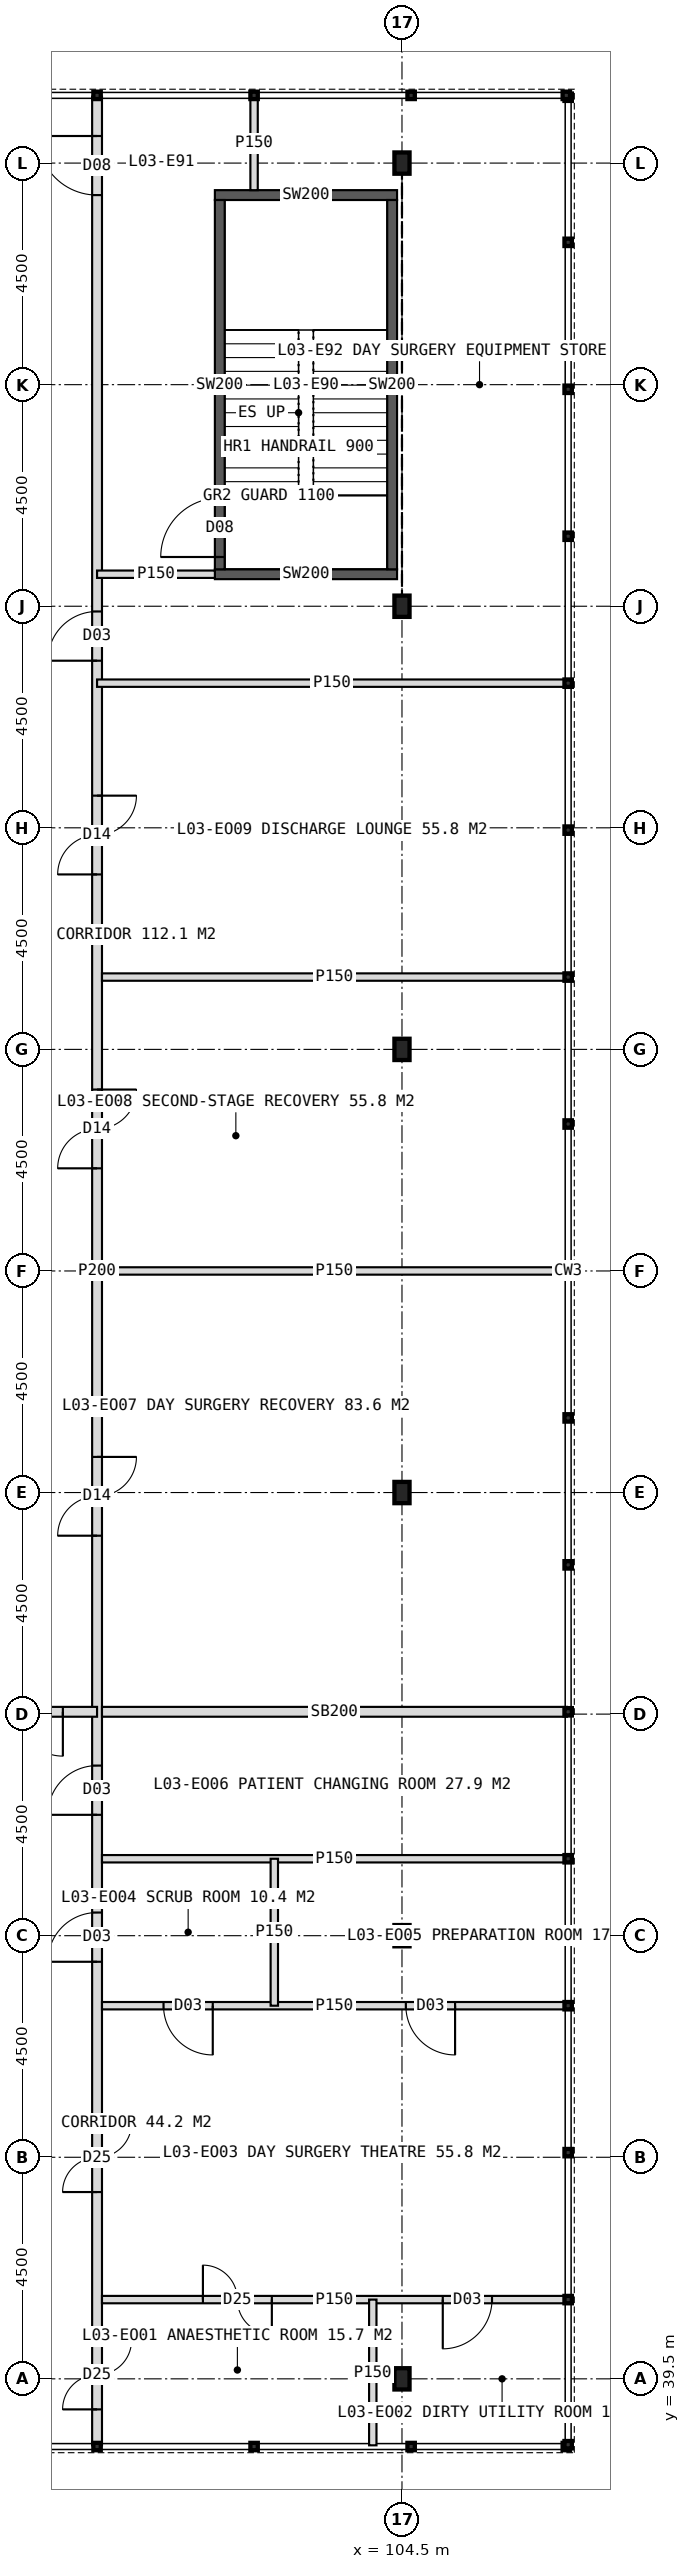
"""IFC4 building model, lengths in metres.
Left out: names, types, materials, properties, quantities, classifications, styles, units other than length and angle.
Written with IfcOpenShell. Run it as: python <this file> out.ifc"""

import sys

from ifc_helpers import new_model, si_unit, direction, frame, frame_2d, origin, origin_2d, place, context, subcontext, project, spatial, rectangle, i_section, extrude, element, fill, save


model = new_model("IFC4")
c1 = context("Model", 3, precision=1e-05, world=origin(), true_north=direction((0.0, 1.0)))
c2 = subcontext(c1, "Body", "Model", "MODEL_VIEW")
j1 = project(units=[si_unit("LENGTHUNIT", "METRE"), si_unit("PLANEANGLEUNIT", "RADIAN")], contexts=[c1])
p1 = place(None, origin())
s1 = spatial("IfcSite", under=j1, at=p1, CompositionType="ELEMENT")
p2 = place(p1, origin())
s2 = spatial("IfcBuilding", under=s1, at=p2, CompositionType="ELEMENT")
p3 = place(p2, frame((0.0, 0.0, 16.5)))
s3 = spatial("IfcBuildingStorey", under=s2, at=p3, CompositionType="ELEMENT", Elevation=16.5)
for number, where, z_axis, x_axis in (
    (1, (104.5, 39.5, 0.0), (0.0, 0.0, 1.0), (1.0, 0.0, 0.0)),
    (2, (104.5, 48.5, 0.0), (0.0, 0.0, 1.0), (1.0, 0.0, 0.0)),
    (3, (104.5, 57.5, 0.0), (0.0, 0.0, 1.0), (1.0, 0.0, 0.0)),
    (4, (104.5, 66.5, 0.0), (0.0, 0.0, 1.0), (1.0, 0.0, 0.0)),
    (5, (104.5, 75.5, 0.0), (0.0, 0.0, 1.0), (1.0, 0.0, 0.0)),
    (6, (104.5, 84.5, 0.0), (0.0, 0.0, 1.0), (1.0, 0.0, 0.0)),
):
    element("IfcColumn", number, at=place(p3, frame(where, z_axis=z_axis, x_axis=x_axis)), inside=s3, PredefinedType="COLUMN", context=c2, shape_type="SweptSolid", body=[
        extrude(i_section(OverallWidth=0.307, OverallDepth=0.432, WebThickness=0.021, FlangeThickness=0.04, FilletRadius=0.027, at=origin_2d()), origin(), (0.0, 0.0, 1.0), 4.5),
    ])
p4 = place(p3, frame((98.307, 38.15, 0.0), z_axis=(0.0, 0.0, 1.0), x_axis=(0.0, 1.0, 0.0)))
e7 = element("IfcWall", 7, at=p4, inside=s3, PredefinedType="PARTITIONING", context=c2, shape_type="SweptSolid", body=[
    extrude(rectangle(XDim=47.7, YDim=0.2, at=frame_2d((23.85, 0.0))), origin(), (0.0, 0.0, 1.0), 4.2),
])
p5 = place(p4, frame((45.7, 0.0, 0.0)))
e8 = element("IfcOpeningElement", 8, at=p5, cuts=e7, PredefinedType="OPENING", context=c2, shape_type="SweptSolid", body=[
    extrude(rectangle(XDim=1.2, YDim=2.1, at=frame_2d((0.6, 1.05))), frame((0.0, 0.11, 0.0), z_axis=(0.0, -1.0, 0.0), x_axis=(1.0, 0.0, 0.0)), (0.0, 0.0, 1.0), 0.22),
])
p6 = place(p4, frame((36.244, 0.0, 0.0)))
e9 = element("IfcOpeningElement", 9, at=p6, cuts=e7, PredefinedType="OPENING", context=c2, shape_type="SweptSolid", body=[
    extrude(rectangle(XDim=1.0, YDim=2.1, at=frame_2d((0.5, 1.05))), frame((0.0, 0.11, 0.0), z_axis=(0.0, -1.0, 0.0), x_axis=(1.0, 0.0, 0.0)), (0.0, 0.0, 1.0), 0.22),
])
p7 = place(p4, frame((0.73, 0.0, 0.0)))
e10 = element("IfcOpeningElement", 10, at=p7, cuts=e7, PredefinedType="OPENING", context=c2, shape_type="SweptSolid", body=[
    extrude(rectangle(XDim=1.4, YDim=2.2, at=frame_2d((0.7, 1.1))), frame((0.0, 0.11, 0.0), z_axis=(0.0, -1.0, 0.0), x_axis=(1.0, 0.0, 0.0)), (0.0, 0.0, 1.0), 0.22),
])
p8 = place(p4, frame((5.144, 0.0, 0.0)))
e11 = element("IfcOpeningElement", 11, at=p8, cuts=e7, PredefinedType="OPENING", context=c2, shape_type="SweptSolid", body=[
    extrude(rectangle(XDim=1.4, YDim=2.2, at=frame_2d((0.7, 1.1))), frame((0.0, 0.11, 0.0), z_axis=(0.0, -1.0, 0.0), x_axis=(1.0, 0.0, 0.0)), (0.0, 0.0, 1.0), 0.22),
])
p9 = place(p4, frame((9.82, 0.0, 0.0)))
e12 = element("IfcOpeningElement", 12, at=p9, cuts=e7, PredefinedType="OPENING", context=c2, shape_type="SweptSolid", body=[
    extrude(rectangle(XDim=1.0, YDim=2.1, at=frame_2d((0.5, 1.05))), frame((0.0, 0.11, 0.0), z_axis=(0.0, -1.0, 0.0), x_axis=(1.0, 0.0, 0.0)), (0.0, 0.0, 1.0), 0.22),
])
p10 = place(p4, frame((12.805, 0.0, 0.0)))
e13 = element("IfcOpeningElement", 13, at=p10, cuts=e7, PredefinedType="OPENING", context=c2, shape_type="SweptSolid", body=[
    extrude(rectangle(XDim=1.0, YDim=2.1, at=frame_2d((0.5, 1.05))), frame((0.0, 0.11, 0.0), z_axis=(0.0, -1.0, 0.0), x_axis=(1.0, 0.0, 0.0)), (0.0, 0.0, 1.0), 0.22),
])
p11 = place(p4, frame((18.473, 0.0, 0.0)))
e14 = element("IfcOpeningElement", 14, at=p11, cuts=e7, PredefinedType="OPENING", context=c2, shape_type="SweptSolid", body=[
    extrude(rectangle(XDim=1.6, YDim=2.2, at=frame_2d((0.8, 1.1))), frame((0.0, 0.11, 0.0), z_axis=(0.0, -1.0, 0.0), x_axis=(1.0, 0.0, 0.0)), (0.0, 0.0, 1.0), 0.22),
])
p12 = place(p4, frame((25.934, 0.0, 0.0)))
e15 = element("IfcOpeningElement", 15, at=p12, cuts=e7, PredefinedType="OPENING", context=c2, shape_type="SweptSolid", body=[
    extrude(rectangle(XDim=1.6, YDim=2.2, at=frame_2d((0.8, 1.1))), frame((0.0, 0.11, 0.0), z_axis=(0.0, -1.0, 0.0), x_axis=(1.0, 0.0, 0.0)), (0.0, 0.0, 1.0), 0.22),
])
p13 = place(p4, frame((31.903, 0.0, 0.0)))
e16 = element("IfcOpeningElement", 16, at=p13, cuts=e7, PredefinedType="OPENING", context=c2, shape_type="SweptSolid", body=[
    extrude(rectangle(XDim=1.6, YDim=2.2, at=frame_2d((0.8, 1.1))), frame((0.0, 0.11, 0.0), z_axis=(0.0, -1.0, 0.0), x_axis=(1.0, 0.0, 0.0)), (0.0, 0.0, 1.0), 0.22),
])
p14 = place(p3, frame((98.307, 53.047, 0.0), z_axis=(0.0, 0.0, 1.0), x_axis=(-1.0, 0.0, 0.0)))
e17 = element("IfcWall", 17, at=p14, inside=s3, PredefinedType="SOLIDWALL", context=c2, shape_type="SweptSolid", body=[
    extrude(rectangle(XDim=3.189, YDim=0.2, at=frame_2d((1.594, 0.0))), origin(), (0.0, 0.0, 1.0), 4.2),
])
p15 = place(p14, frame((0.695, 0.0, 0.0)))
e18 = element("IfcOpeningElement", 18, at=p15, cuts=e17, PredefinedType="OPENING", context=c2, shape_type="SweptSolid", body=[
    extrude(rectangle(XDim=1.8, YDim=2.2, at=frame_2d((0.9, 1.1))), frame((0.0, 0.11, 0.0), z_axis=(0.0, -1.0, 0.0), x_axis=(1.0, 0.0, 0.0)), (0.0, 0.0, 1.0), 0.22),
])
for number, where, z_axis, x_axis in (
    (19, (100.7, 76.15, 0.0), (0.0, 0.0, 1.0), (1.0, 0.0, 0.0)),
    (20, (100.7, 83.85, 0.0), (0.0, 0.0, 1.0), (1.0, 0.0, 0.0)),
):
    element("IfcWall", number, at=place(p3, frame(where, z_axis=z_axis, x_axis=x_axis)), inside=s3, PredefinedType="SOLIDWALL", context=c2, shape_type="SweptSolid", body=[
        extrude(rectangle(XDim=3.7, YDim=0.2, at=frame_2d((1.85, 0.0))), origin(), (0.0, 0.0, 1.0), 4.2),
    ])
p16 = place(p3, frame((100.8, 76.25, 0.0), z_axis=(0.0, 0.0, 1.0), x_axis=(0.0, 1.0, 0.0)))
e21 = element("IfcWall", 21, at=p16, inside=s3, PredefinedType="SOLIDWALL", context=c2, shape_type="SweptSolid", body=[
    extrude(rectangle(XDim=7.5, YDim=0.2, at=frame_2d((3.75, 0.0))), origin(), (0.0, 0.0, 1.0), 4.2),
])
p17 = place(p16, frame((0.25, 0.0, 0.0)))
e22 = element("IfcOpeningElement", 22, at=p17, cuts=e21, PredefinedType="OPENING", context=c2, shape_type="SweptSolid", body=[
    extrude(rectangle(XDim=1.2, YDim=2.1, at=frame_2d((0.6, 1.05))), frame((0.0, 0.11, 0.0), z_axis=(0.0, -1.0, 0.0), x_axis=(1.0, 0.0, 0.0)), (0.0, 0.0, 1.0), 0.22),
])
p18 = place(p3, frame((104.3, 76.25, 0.0), z_axis=(0.0, 0.0, 1.0), x_axis=(0.0, 1.0, 0.0)))
e23 = element("IfcWall", 23, at=p18, inside=s3, PredefinedType="SOLIDWALL", context=c2, shape_type="SweptSolid", body=[
    extrude(rectangle(XDim=7.5, YDim=0.2, at=frame_2d((3.75, 0.0))), origin(), (0.0, 0.0, 1.0), 4.2),
])
p19 = place(p3, frame((100.7, 76.15, 0.0), z_axis=(0.0, 0.0, 1.0), x_axis=(-1.0, 0.0, 0.0)))
e24 = element("IfcWall", 24, at=p19, inside=s3, PredefinedType="PARTITIONING", context=c2, shape_type="SweptSolid", body=[
    extrude(rectangle(XDim=2.393, YDim=0.15, at=frame_2d((1.197, 0.0))), origin(), (0.0, 0.0, 1.0), 4.2),
])
p20 = place(p3, frame((101.496, 83.95, 0.0), z_axis=(0.0, 0.0, 1.0), x_axis=(0.0, 1.0, 0.0)))
e25 = element("IfcWall", 25, at=p20, inside=s3, PredefinedType="PARTITIONING", context=c2, shape_type="SweptSolid", body=[
    extrude(rectangle(XDim=1.9, YDim=0.15, at=frame_2d((0.95, 0.0))), origin(), (0.0, 0.0, 1.0), 4.2),
])
p21 = place(p3, frame((107.85, 73.938, 0.0), z_axis=(0.0, 0.0, 1.0), x_axis=(-1.0, 0.0, 0.0)))
e26 = element("IfcWall", 26, at=p21, inside=s3, PredefinedType="PARTITIONING", context=c2, shape_type="SweptSolid", body=[
    extrude(rectangle(XDim=9.543, YDim=0.15, at=frame_2d((4.771, 0.0))), origin(), (0.0, 0.0, 1.0), 4.2),
])
p22 = place(p3, frame((107.85, 41.109, 0.0), z_axis=(0.0, 0.0, 1.0), x_axis=(-1.0, 0.0, 0.0)))
e27 = element("IfcWall", 27, at=p22, inside=s3, PredefinedType="PARTITIONING", context=c2, shape_type="SweptSolid", body=[
    extrude(rectangle(XDim=9.443, YDim=0.15, at=frame_2d((4.722, 0.0))), origin(), (0.0, 0.0, 1.0), 4.2),
])
p23 = place(p22, frame((5.993, 0.0, 0.0)))
e28 = element("IfcOpeningElement", 28, at=p23, cuts=e27, PredefinedType="OPENING", context=c2, shape_type="SweptSolid", body=[
    extrude(rectangle(XDim=1.4, YDim=2.2, at=frame_2d((0.7, 1.1))), frame((0.0, 0.085, 0.0), z_axis=(0.0, -1.0, 0.0), x_axis=(1.0, 0.0, 0.0)), (0.0, 0.0, 1.0), 0.17),
])
p24 = place(p22, frame((1.521, 0.0, 0.0)))
e29 = element("IfcOpeningElement", 29, at=p24, cuts=e27, PredefinedType="OPENING", context=c2, shape_type="SweptSolid", body=[
    extrude(rectangle(XDim=1.0, YDim=2.1, at=frame_2d((0.5, 1.05))), frame((0.0, 0.085, 0.0), z_axis=(0.0, -1.0, 0.0), x_axis=(1.0, 0.0, 0.0)), (0.0, 0.0, 1.0), 0.17),
])
p25 = place(p3, frame((107.85, 47.078, 0.0), z_axis=(0.0, 0.0, 1.0), x_axis=(-1.0, 0.0, 0.0)))
e30 = element("IfcWall", 30, at=p25, inside=s3, PredefinedType="PARTITIONING", context=c2, shape_type="SweptSolid", body=[
    extrude(rectangle(XDim=9.443, YDim=0.15, at=frame_2d((4.722, 0.0))), origin(), (0.0, 0.0, 1.0), 4.2),
])
p26 = place(p25, frame((7.193, 0.0, 0.0)))
e31 = element("IfcOpeningElement", 31, at=p26, cuts=e30, PredefinedType="OPENING", context=c2, shape_type="SweptSolid", body=[
    extrude(rectangle(XDim=1.0, YDim=2.1, at=frame_2d((0.5, 1.05))), frame((0.0, 0.085, 0.0), z_axis=(0.0, -1.0, 0.0), x_axis=(1.0, 0.0, 0.0)), (0.0, 0.0, 1.0), 0.17),
])
p27 = place(p25, frame((2.271, 0.0, 0.0)))
e32 = element("IfcOpeningElement", 32, at=p27, cuts=e30, PredefinedType="OPENING", context=c2, shape_type="SweptSolid", body=[
    extrude(rectangle(XDim=1.0, YDim=2.1, at=frame_2d((0.5, 1.05))), frame((0.0, 0.085, 0.0), z_axis=(0.0, -1.0, 0.0), x_axis=(1.0, 0.0, 0.0)), (0.0, 0.0, 1.0), 0.17),
])
p28 = place(p3, frame((107.85, 50.062, 0.0), z_axis=(0.0, 0.0, 1.0), x_axis=(-1.0, 0.0, 0.0)))
e33 = element("IfcWall", 33, at=p28, inside=s3, PredefinedType="PARTITIONING", context=c2, shape_type="SweptSolid", body=[
    extrude(rectangle(XDim=9.443, YDim=0.15, at=frame_2d((4.722, 0.0))), origin(), (0.0, 0.0, 1.0), 4.2),
])
p29 = place(p3, frame((107.85, 53.047, 0.0), z_axis=(0.0, 0.0, 1.0), x_axis=(-1.0, 0.0, 0.0)))
e34 = element("IfcWall", 34, at=p29, inside=s3, PredefinedType="SOLIDWALL", context=c2, shape_type="SweptSolid", body=[
    extrude(rectangle(XDim=9.443, YDim=0.2, at=frame_2d((4.722, 0.0))), origin(), (0.0, 0.0, 1.0), 4.2),
])
for number, where, z_axis, x_axis in (
    (35, (107.85, 62.0, 0.0), (0.0, 0.0, 1.0), (-1.0, 0.0, 0.0)),
    (36, (107.85, 67.969, 0.0), (0.0, 0.0, 1.0), (-1.0, 0.0, 0.0)),
):
    element("IfcWall", number, at=place(p3, frame(where, z_axis=z_axis, x_axis=x_axis)), inside=s3, PredefinedType="PARTITIONING", context=c2, shape_type="SweptSolid", body=[
        extrude(rectangle(XDim=9.443, YDim=0.15, at=frame_2d((4.722, 0.0))), origin(), (0.0, 0.0, 1.0), 4.2),
    ])
p30 = place(p3, frame((103.907, 38.15, 0.0), z_axis=(0.0, 0.0, 1.0), x_axis=(0.0, 1.0, 0.0)))
e37 = element("IfcWall", 37, at=p30, inside=s3, PredefinedType="PARTITIONING", context=c2, shape_type="SweptSolid", body=[
    extrude(rectangle(XDim=2.959, YDim=0.15, at=frame_2d((1.48, 0.0))), origin(), (0.0, 0.0, 1.0), 4.2),
])
p31 = place(p3, frame((101.907, 47.078, 0.0), z_axis=(0.0, 0.0, 1.0), x_axis=(0.0, 1.0, 0.0)))
e38 = element("IfcWall", 38, at=p31, inside=s3, PredefinedType="PARTITIONING", context=c2, shape_type="SweptSolid", body=[
    extrude(rectangle(XDim=2.984, YDim=0.15, at=frame_2d((1.492, 0.0))), origin(), (0.0, 0.0, 1.0), 4.2),
])
p32 = place(p15, origin())
e39 = element("IfcDoor", 39, at=p32, inside=s3, OperationType="DOUBLE_DOOR_DOUBLE_SWING", PredefinedType="DOOR", context=c2, shape_type="SweptSolid", body=[
    extrude(rectangle(XDim=1.8, YDim=2.2, at=frame_2d((0.9, 1.1))), frame((0.0, 0.025, 0.0), z_axis=(0.0, -1.0, 0.0), x_axis=(1.0, 0.0, 0.0)), (0.0, 0.0, 1.0), 0.05),
])
fill(e18, e39)
p33 = place(p17, origin())
e40 = element("IfcDoor", 40, at=p33, inside=s3, OperationType="SINGLE_SWING_LEFT", PredefinedType="DOOR", context=c2, shape_type="SweptSolid", body=[
    extrude(rectangle(XDim=1.2, YDim=2.1, at=frame_2d((0.6, 1.05))), frame((0.0, 0.025, 0.0), z_axis=(0.0, -1.0, 0.0), x_axis=(1.0, 0.0, 0.0)), (0.0, 0.0, 1.0), 0.05),
])
fill(e22, e40)
p34 = place(p5, origin())
e41 = element("IfcDoor", 41, at=p34, inside=s3, OperationType="SINGLE_SWING_RIGHT", PredefinedType="DOOR", context=c2, shape_type="SweptSolid", body=[
    extrude(rectangle(XDim=1.2, YDim=2.1, at=frame_2d((0.6, 1.05))), frame((0.0, 0.025, 0.0), z_axis=(0.0, -1.0, 0.0), x_axis=(1.0, 0.0, 0.0)), (0.0, 0.0, 1.0), 0.05),
])
fill(e8, e41)
p35 = place(p6, origin())
e42 = element("IfcDoor", 42, at=p35, inside=s3, OperationType="SINGLE_SWING_LEFT", PredefinedType="DOOR", context=c2, shape_type="SweptSolid", body=[
    extrude(rectangle(XDim=1.0, YDim=2.1, at=frame_2d((0.5, 1.05))), frame((0.0, 0.025, 0.0), z_axis=(0.0, -1.0, 0.0), x_axis=(1.0, 0.0, 0.0)), (0.0, 0.0, 1.0), 0.05),
])
fill(e9, e42)
p36 = place(p7, origin())
e43 = element("IfcDoor", 43, at=p36, inside=s3, OperationType="DOUBLE_DOOR_SINGLE_SWING", PredefinedType="DOOR", context=c2, shape_type="SweptSolid", body=[
    extrude(rectangle(XDim=1.4, YDim=2.2, at=frame_2d((0.7, 1.1))), frame((0.0, 0.025, 0.0), z_axis=(0.0, -1.0, 0.0), x_axis=(1.0, 0.0, 0.0)), (0.0, 0.0, 1.0), 0.05),
])
fill(e10, e43)
p37 = place(p23, origin())
e44 = element("IfcDoor", 44, at=p37, inside=s3, OperationType="DOUBLE_DOOR_SINGLE_SWING", PredefinedType="DOOR", context=c2, shape_type="SweptSolid", body=[
    extrude(rectangle(XDim=1.4, YDim=2.2, at=frame_2d((0.7, 1.1))), frame((0.0, 0.025, 0.0), z_axis=(0.0, -1.0, 0.0), x_axis=(1.0, 0.0, 0.0)), (0.0, 0.0, 1.0), 0.05),
])
fill(e28, e44)
p38 = place(p24, origin())
e45 = element("IfcDoor", 45, at=p38, inside=s3, OperationType="SINGLE_SWING_RIGHT", PredefinedType="DOOR", context=c2, shape_type="SweptSolid", body=[
    extrude(rectangle(XDim=1.0, YDim=2.1, at=frame_2d((0.5, 1.05))), frame((0.0, 0.025, 0.0), z_axis=(0.0, -1.0, 0.0), x_axis=(1.0, 0.0, 0.0)), (0.0, 0.0, 1.0), 0.05),
])
fill(e29, e45)
p39 = place(p8, origin())
e46 = element("IfcDoor", 46, at=p39, inside=s3, OperationType="DOUBLE_DOOR_SINGLE_SWING", PredefinedType="DOOR", context=c2, shape_type="SweptSolid", body=[
    extrude(rectangle(XDim=1.4, YDim=2.2, at=frame_2d((0.7, 1.1))), frame((0.0, 0.025, 0.0), z_axis=(0.0, -1.0, 0.0), x_axis=(1.0, 0.0, 0.0)), (0.0, 0.0, 1.0), 0.05),
])
fill(e11, e46)
p40 = place(p9, origin())
e47 = element("IfcDoor", 47, at=p40, inside=s3, OperationType="SINGLE_SWING_LEFT", PredefinedType="DOOR", context=c2, shape_type="SweptSolid", body=[
    extrude(rectangle(XDim=1.0, YDim=2.1, at=frame_2d((0.5, 1.05))), frame((0.0, 0.025, 0.0), z_axis=(0.0, -1.0, 0.0), x_axis=(1.0, 0.0, 0.0)), (0.0, 0.0, 1.0), 0.05),
])
fill(e12, e47)
p41 = place(p26, origin())
e48 = element("IfcDoor", 48, at=p41, inside=s3, OperationType="SINGLE_SWING_LEFT", PredefinedType="DOOR", context=c2, shape_type="SweptSolid", body=[
    extrude(rectangle(XDim=1.0, YDim=2.1, at=frame_2d((0.5, 1.05))), frame((0.0, 0.025, 0.0), z_axis=(0.0, -1.0, 0.0), x_axis=(1.0, 0.0, 0.0)), (0.0, 0.0, 1.0), 0.05),
])
fill(e31, e48)
p42 = place(p27, origin())
e49 = element("IfcDoor", 49, at=p42, inside=s3, OperationType="SINGLE_SWING_LEFT", PredefinedType="DOOR", context=c2, shape_type="SweptSolid", body=[
    extrude(rectangle(XDim=1.0, YDim=2.1, at=frame_2d((0.5, 1.05))), frame((0.0, 0.025, 0.0), z_axis=(0.0, -1.0, 0.0), x_axis=(1.0, 0.0, 0.0)), (0.0, 0.0, 1.0), 0.05),
])
fill(e32, e49)
p43 = place(p10, origin())
e50 = element("IfcDoor", 50, at=p43, inside=s3, OperationType="SINGLE_SWING_LEFT", PredefinedType="DOOR", context=c2, shape_type="SweptSolid", body=[
    extrude(rectangle(XDim=1.0, YDim=2.1, at=frame_2d((0.5, 1.05))), frame((0.0, 0.025, 0.0), z_axis=(0.0, -1.0, 0.0), x_axis=(1.0, 0.0, 0.0)), (0.0, 0.0, 1.0), 0.05),
])
fill(e13, e50)
p44 = place(p11, origin())
e51 = element("IfcDoor", 51, at=p44, inside=s3, OperationType="DOUBLE_DOOR_DOUBLE_SWING", PredefinedType="DOOR", context=c2, shape_type="SweptSolid", body=[
    extrude(rectangle(XDim=1.6, YDim=2.2, at=frame_2d((0.8, 1.1))), frame((0.0, 0.025, 0.0), z_axis=(0.0, -1.0, 0.0), x_axis=(1.0, 0.0, 0.0)), (0.0, 0.0, 1.0), 0.05),
])
fill(e14, e51)
p45 = place(p12, origin())
e52 = element("IfcDoor", 52, at=p45, inside=s3, OperationType="DOUBLE_DOOR_DOUBLE_SWING", PredefinedType="DOOR", context=c2, shape_type="SweptSolid", body=[
    extrude(rectangle(XDim=1.6, YDim=2.2, at=frame_2d((0.8, 1.1))), frame((0.0, 0.025, 0.0), z_axis=(0.0, -1.0, 0.0), x_axis=(1.0, 0.0, 0.0)), (0.0, 0.0, 1.0), 0.05),
])
fill(e15, e52)
p46 = place(p13, origin())
e53 = element("IfcDoor", 53, at=p46, inside=s3, OperationType="DOUBLE_DOOR_DOUBLE_SWING", PredefinedType="DOOR", context=c2, shape_type="SweptSolid", body=[
    extrude(rectangle(XDim=1.6, YDim=2.2, at=frame_2d((0.8, 1.1))), frame((0.0, 0.025, 0.0), z_axis=(0.0, -1.0, 0.0), x_axis=(1.0, 0.0, 0.0)), (0.0, 0.0, 1.0), 0.05),
])
fill(e16, e53)
save(model, sys.argv[1])
